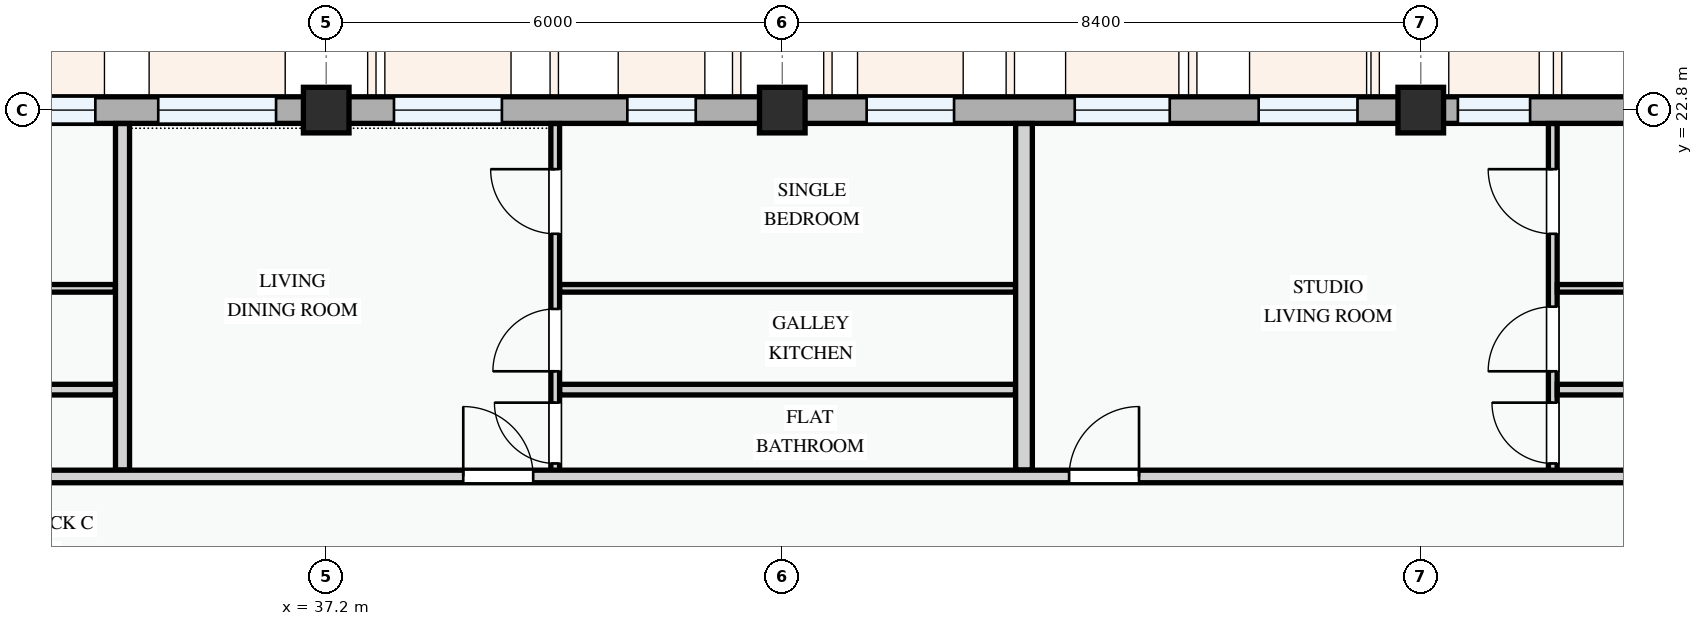
"""IFC4 building model, lengths in metres.
Left out: names, types, materials, properties, quantities, classifications, styles, units other than length and angle.
Written with IfcOpenShell. Run it as: python <this file> out.ifc"""

import sys

from ifc_helpers import new_model, si_unit, direction, frame, frame_2d, origin, origin_2d, place, context, subcontext, project, spatial, rectangle, extrude, element, fill, save


model = new_model("IFC4")
c1 = context("Model", 3, precision=1e-05, world=origin(), true_north=direction((0.0, 1.0)))
c2 = subcontext(c1, "Body", "Model", "MODEL_VIEW")
j1 = project(units=[si_unit("LENGTHUNIT", "METRE"), si_unit("PLANEANGLEUNIT", "RADIAN")], contexts=[c1])
p1 = place(None, origin())
s1 = spatial("IfcSite", under=j1, at=p1, CompositionType="ELEMENT")
p2 = place(p1, origin())
s2 = spatial("IfcBuilding", under=s1, at=p2, CompositionType="ELEMENT")
p3 = place(p2, frame((0.0, 0.0, 8.1)))
s3 = spatial("IfcBuildingStorey", under=s2, at=p3, CompositionType="ELEMENT", Elevation=8.1)
for number, where, z_axis, x_axis in (
    (1, (37.2, 22.8, 0.0), (0.0, 0.0, 1.0), (1.0, 0.0, 0.0)),
    (2, (43.2, 22.8, 0.0), (0.0, 0.0, 1.0), (1.0, 0.0, 0.0)),
    (3, (51.6, 22.8, 0.0), (0.0, 0.0, 1.0), (1.0, 0.0, 0.0)),
):
    element("IfcColumn", number, at=place(p3, frame(where, z_axis=z_axis, x_axis=x_axis)), inside=s3, PredefinedType="COLUMN", context=c2, shape_type="SweptSolid", body=[
        extrude(rectangle(XDim=0.6, YDim=0.6, at=origin_2d()), origin(), (0.0, 0.0, 1.0), 3.3),
    ])
p4 = place(p3, frame((57.6, 22.8, 0.0), z_axis=(0.0, 0.0, 1.0), x_axis=(-1.0, 0.0, 0.0)))
e4 = element("IfcWall", 4, at=p4, inside=s3, PredefinedType="STANDARD", context=c2, shape_type="SweptSolid", body=[
    extrude(rectangle(XDim=6.0, YDim=0.35, at=frame_2d((3.0, 0.0))), origin(), (0.0, 0.0, 1.0), 2.475),
])
p5 = place(p4, frame((1.777, 0.0, 0.78)))
e5 = element("IfcOpeningElement", 5, at=p5, cuts=e4, PredefinedType="OPENING", context=c2, shape_type="SweptSolid", body=[
    extrude(rectangle(XDim=0.9, YDim=1.2, at=frame_2d((0.45, 0.6))), frame((0.0, 0.185, 0.0), z_axis=(0.0, -1.0, 0.0), x_axis=(1.0, 0.0, 0.0)), (0.0, 0.0, 1.0), 0.37),
])
p6 = place(p4, frame((4.562, 0.0, 0.78)))
e6 = element("IfcOpeningElement", 6, at=p6, cuts=e4, PredefinedType="OPENING", context=c2, shape_type="SweptSolid", body=[
    extrude(rectangle(XDim=0.95, YDim=1.15, at=frame_2d((0.475, 0.575))), frame((0.0, 0.185, 0.0), z_axis=(0.0, -1.0, 0.0), x_axis=(1.0, 0.0, 0.0)), (0.0, 0.0, 1.0), 0.37),
])
p7 = place(p3, frame((51.6, 22.8, 0.0), z_axis=(0.0, 0.0, 1.0), x_axis=(-1.0, 0.0, 0.0)))
e7 = element("IfcWall", 7, at=p7, inside=s3, PredefinedType="STANDARD", context=c2, shape_type="SweptSolid", body=[
    extrude(rectangle(XDim=8.4, YDim=0.35, at=frame_2d((4.2, 0.0))), origin(), (0.0, 0.0, 1.0), 2.375),
])
p8 = place(p7, frame((0.833, 0.0, 0.78)))
e8 = element("IfcOpeningElement", 8, at=p8, cuts=e7, PredefinedType="OPENING", context=c2, shape_type="SweptSolid", body=[
    extrude(rectangle(XDim=1.3, YDim=1.4, at=frame_2d((0.65, 0.7))), frame((0.0, 0.185, 0.0), z_axis=(0.0, -1.0, 0.0), x_axis=(1.0, 0.0, 0.0)), (0.0, 0.0, 1.0), 0.37),
])
p9 = place(p7, frame((3.302, 0.0, 0.78)))
e9 = element("IfcOpeningElement", 9, at=p9, cuts=e7, PredefinedType="OPENING", context=c2, shape_type="SweptSolid", body=[
    extrude(rectangle(XDim=1.25, YDim=1.3, at=frame_2d((0.625, 0.65))), frame((0.0, 0.185, 0.0), z_axis=(0.0, -1.0, 0.0), x_axis=(1.0, 0.0, 0.0)), (0.0, 0.0, 1.0), 0.37),
])
p10 = place(p7, frame((6.14, 0.0, 0.78)))
e10 = element("IfcOpeningElement", 10, at=p10, cuts=e7, PredefinedType="OPENING", context=c2, shape_type="SweptSolid", body=[
    extrude(rectangle(XDim=1.15, YDim=1.25, at=frame_2d((0.575, 0.625))), frame((0.0, 0.185, 0.0), z_axis=(0.0, -1.0, 0.0), x_axis=(1.0, 0.0, 0.0)), (0.0, 0.0, 1.0), 0.37),
])
p11 = place(p3, frame((43.2, 22.8, 0.0), z_axis=(0.0, 0.0, 1.0), x_axis=(-1.0, 0.0, 0.0)))
e11 = element("IfcWall", 11, at=p11, inside=s3, PredefinedType="STANDARD", context=c2, shape_type="SweptSolid", body=[
    extrude(rectangle(XDim=6.0, YDim=0.35, at=frame_2d((3.0, 0.0))), origin(), (0.0, 0.0, 1.0), 2.475),
])
p12 = place(p11, frame((1.139, 0.0, 0.78)))
e12 = element("IfcOpeningElement", 12, at=p12, cuts=e11, PredefinedType="OPENING", context=c2, shape_type="SweptSolid", body=[
    extrude(rectangle(XDim=0.9, YDim=1.2, at=frame_2d((0.45, 0.6))), frame((0.0, 0.185, 0.0), z_axis=(0.0, -1.0, 0.0), x_axis=(1.0, 0.0, 0.0)), (0.0, 0.0, 1.0), 0.37),
])
p13 = place(p11, frame((3.689, 0.0, 0.78)))
e13 = element("IfcOpeningElement", 13, at=p13, cuts=e11, PredefinedType="OPENING", context=c2, shape_type="SweptSolid", body=[
    extrude(rectangle(XDim=1.42, YDim=1.38, at=frame_2d((0.71, 0.69))), frame((0.0, 0.185, 0.0), z_axis=(0.0, -1.0, 0.0), x_axis=(1.0, 0.0, 0.0)), (0.0, 0.0, 1.0), 0.37),
])
p14 = place(p3, frame((37.2, 22.8, 0.0), z_axis=(0.0, 0.0, 1.0), x_axis=(-1.0, 0.0, 0.0)))
e14 = element("IfcWall", 14, at=p14, inside=s3, PredefinedType="STANDARD", context=c2, shape_type="SweptSolid", body=[
    extrude(rectangle(XDim=8.4, YDim=0.35, at=frame_2d((4.2, 0.0))), origin(), (0.0, 0.0, 1.0), 2.375),
])
p15 = place(p14, frame((0.66, 0.0, 0.78)))
e15 = element("IfcOpeningElement", 15, at=p15, cuts=e14, PredefinedType="OPENING", context=c2, shape_type="SweptSolid", body=[
    extrude(rectangle(XDim=1.55, YDim=1.4, at=frame_2d((0.775, 0.7))), frame((0.0, 0.185, 0.0), z_axis=(0.0, -1.0, 0.0), x_axis=(1.0, 0.0, 0.0)), (0.0, 0.0, 1.0), 0.37),
])
p16 = place(p14, frame((3.038, 0.0, 0.78)))
e16 = element("IfcOpeningElement", 16, at=p16, cuts=e14, PredefinedType="OPENING", context=c2, shape_type="SweptSolid", body=[
    extrude(rectangle(XDim=2.12, YDim=1.44, at=frame_2d((1.06, 0.72))), frame((0.0, 0.185, 0.0), z_axis=(0.0, -1.0, 0.0), x_axis=(1.0, 0.0, 0.0)), (0.0, 0.0, 1.0), 0.37),
])
p17 = place(p14, frame((6.093, 0.0, 0.78)))
e17 = element("IfcOpeningElement", 17, at=p17, cuts=e14, PredefinedType="OPENING", context=c2, shape_type="SweptSolid", body=[
    extrude(rectangle(XDim=1.4, YDim=1.45, at=frame_2d((0.7, 0.725))), frame((0.0, 0.185, 0.0), z_axis=(0.0, -1.0, 0.0), x_axis=(1.0, 0.0, 0.0)), (0.0, 0.0, 1.0), 0.37),
])
p18 = place(p3, frame((27.112, 20.455, 0.0), z_axis=(0.0, 0.0, 1.0), x_axis=(1.0, 0.0, 0.0)))
e18 = element("IfcWall", 18, at=p18, inside=s3, PredefinedType="PARTITIONING", context=c2, shape_type="SweptSolid", body=[
    extrude(rectangle(XDim=7.313, YDim=0.1, at=frame_2d((3.657, 0.0))), origin(), (0.0, 0.0, 1.0), 3.0),
])
p19 = place(p3, frame((27.112, 19.122, 0.0), z_axis=(0.0, 0.0, 1.0), x_axis=(1.0, 0.0, 0.0)))
e19 = element("IfcWall", 19, at=p19, inside=s3, PredefinedType="PARTITIONING", context=c2, shape_type="SweptSolid", body=[
    extrude(rectangle(XDim=7.313, YDim=0.14, at=frame_2d((3.657, 0.0))), origin(), (0.0, 0.0, 1.0), 3.0),
])
p20 = place(p3, frame((40.213, 17.98, 0.0), z_axis=(0.0, 0.0, 1.0), x_axis=(0.0, 1.0, 0.0)))
e20 = element("IfcWall", 20, at=p20, inside=s3, PredefinedType="PARTITIONING", context=c2, shape_type="SweptSolid", body=[
    extrude(rectangle(XDim=4.643, YDim=0.115, at=frame_2d((2.322, 0.0))), origin(), (0.0, 0.0, 1.0), 3.0),
])
p21 = place(p20, frame((0.171, 0.0, 0.0)))
e21 = element("IfcOpeningElement", 21, at=p21, cuts=e20, PredefinedType="OPENING", context=c2, shape_type="SweptSolid", body=[
    extrude(rectangle(XDim=0.8, YDim=2.1, at=frame_2d((0.4, 1.05))), frame((0.0, 0.067, 0.0), z_axis=(0.0, -1.0, 0.0), x_axis=(1.0, 0.0, 0.0)), (0.0, 0.0, 1.0), 0.135),
])
p22 = place(p20, frame((1.384, 0.0, 0.0)))
e22 = element("IfcOpeningElement", 22, at=p22, cuts=e20, PredefinedType="OPENING", context=c2, shape_type="SweptSolid", body=[
    extrude(rectangle(XDim=0.82, YDim=2.08, at=frame_2d((0.41, 1.04))), frame((0.0, 0.067, 0.0), z_axis=(0.0, -1.0, 0.0), x_axis=(1.0, 0.0, 0.0)), (0.0, 0.0, 1.0), 0.135),
])
p23 = place(p20, frame((3.193, 0.0, 0.0)))
e23 = element("IfcOpeningElement", 23, at=p23, cuts=e20, PredefinedType="OPENING", context=c2, shape_type="SweptSolid", body=[
    extrude(rectangle(XDim=0.85, YDim=2.1, at=frame_2d((0.425, 1.05))), frame((0.0, 0.067, 0.0), z_axis=(0.0, -1.0, 0.0), x_axis=(1.0, 0.0, 0.0)), (0.0, 0.0, 1.0), 0.135),
])
p24 = place(p3, frame((40.272, 20.455, 0.0), z_axis=(0.0, 0.0, 1.0), x_axis=(1.0, 0.0, 0.0)))
e24 = element("IfcWall", 24, at=p24, inside=s3, PredefinedType="PARTITIONING", context=c2, shape_type="SweptSolid", body=[
    extrude(rectangle(XDim=5.996, YDim=0.1, at=frame_2d((2.998, 0.0))), origin(), (0.0, 0.0, 1.0), 3.0),
])
p25 = place(p3, frame((40.272, 19.122, 0.0), z_axis=(0.0, 0.0, 1.0), x_axis=(1.0, 0.0, 0.0)))
e25 = element("IfcWall", 25, at=p25, inside=s3, PredefinedType="PARTITIONING", context=c2, shape_type="SweptSolid", body=[
    extrude(rectangle(XDim=5.996, YDim=0.14, at=frame_2d((2.998, 0.0))), origin(), (0.0, 0.0, 1.0), 3.0),
])
p26 = place(p3, frame((34.52, 18.064, 0.0), z_axis=(0.0, 0.0, 1.0), x_axis=(0.0, 1.0, 0.0)))
e26 = element("IfcWall", 26, at=p26, inside=s3, PredefinedType="PARTITIONING", context=c2, shape_type="SweptSolid", body=[
    extrude(rectangle(XDim=4.559, YDim=0.185, at=frame_2d((2.279, 0.0))), origin(), (0.0, 0.0, 1.0), 3.0),
])
p27 = place(p3, frame((53.337, 17.98, 0.0), z_axis=(0.0, 0.0, 1.0), x_axis=(0.0, 1.0, 0.0)))
e27 = element("IfcWall", 27, at=p27, inside=s3, PredefinedType="PARTITIONING", context=c2, shape_type="SweptSolid", body=[
    extrude(rectangle(XDim=4.643, YDim=0.115, at=frame_2d((2.322, 0.0))), origin(), (0.0, 0.0, 1.0), 3.0),
])
p28 = place(p27, frame((0.171, 0.0, 0.0)))
e28 = element("IfcOpeningElement", 28, at=p28, cuts=e27, PredefinedType="OPENING", context=c2, shape_type="SweptSolid", body=[
    extrude(rectangle(XDim=0.8, YDim=2.1, at=frame_2d((0.4, 1.05))), frame((0.0, 0.067, 0.0), z_axis=(0.0, -1.0, 0.0), x_axis=(1.0, 0.0, 0.0)), (0.0, 0.0, 1.0), 0.135),
])
p29 = place(p27, frame((1.384, 0.0, 0.0)))
e29 = element("IfcOpeningElement", 29, at=p29, cuts=e27, PredefinedType="OPENING", context=c2, shape_type="SweptSolid", body=[
    extrude(rectangle(XDim=0.85, YDim=2.1, at=frame_2d((0.425, 1.05))), frame((0.0, 0.067, 0.0), z_axis=(0.0, -1.0, 0.0), x_axis=(1.0, 0.0, 0.0)), (0.0, 0.0, 1.0), 0.135),
])
p30 = place(p27, frame((3.193, 0.0, 0.0)))
e30 = element("IfcOpeningElement", 30, at=p30, cuts=e27, PredefinedType="OPENING", context=c2, shape_type="SweptSolid", body=[
    extrude(rectangle(XDim=0.85, YDim=2.1, at=frame_2d((0.425, 1.05))), frame((0.0, 0.067, 0.0), z_axis=(0.0, -1.0, 0.0), x_axis=(1.0, 0.0, 0.0)), (0.0, 0.0, 1.0), 0.135),
])
p31 = place(p3, frame((53.396, 20.455, 0.0), z_axis=(0.0, 0.0, 1.0), x_axis=(1.0, 0.0, 0.0)))
e31 = element("IfcWall", 31, at=p31, inside=s3, PredefinedType="PARTITIONING", context=c2, shape_type="SweptSolid", body=[
    extrude(rectangle(XDim=4.027, YDim=0.1, at=frame_2d((2.013, 0.0))), origin(), (0.0, 0.0, 1.0), 3.0),
])
p32 = place(p3, frame((53.396, 19.122, 0.0), z_axis=(0.0, 0.0, 1.0), x_axis=(1.0, 0.0, 0.0)))
e32 = element("IfcWall", 32, at=p32, inside=s3, PredefinedType="PARTITIONING", context=c2, shape_type="SweptSolid", body=[
    extrude(rectangle(XDim=4.027, YDim=0.14, at=frame_2d((2.013, 0.0))), origin(), (0.0, 0.0, 1.0), 3.0),
])
p33 = place(p3, frame((46.38, 18.064, 0.0), z_axis=(0.0, 0.0, 1.0), x_axis=(0.0, 1.0, 0.0)))
e33 = element("IfcWall", 33, at=p33, inside=s3, PredefinedType="PARTITIONING", context=c2, shape_type="SweptSolid", body=[
    extrude(rectangle(XDim=4.559, YDim=0.22, at=frame_2d((2.279, 0.0))), origin(), (0.0, 0.0, 1.0), 3.0),
])
p34 = place(p3, frame((22.66, 17.98, 0.0), z_axis=(0.0, 0.0, 1.0), x_axis=(1.0, 0.0, 0.0)))
e34 = element("IfcWall", 34, at=p34, inside=s3, PredefinedType="PARTITIONING", context=c2, shape_type="SweptSolid", body=[
    extrude(rectangle(XDim=34.763, YDim=0.165, at=frame_2d((17.382, 0.0))), origin(), (0.0, 0.0, 1.0), 3.0),
])
p35 = place(p34, frame((2.633, 0.0, 0.0)))
e35 = element("IfcOpeningElement", 35, at=p35, cuts=e34, PredefinedType="OPENING", context=c2, shape_type="SweptSolid", body=[
    extrude(rectangle(XDim=0.92, YDim=2.1, at=frame_2d((0.46, 1.05))), frame((0.0, 0.093, 0.0), z_axis=(0.0, -1.0, 0.0), x_axis=(1.0, 0.0, 0.0)), (0.0, 0.0, 1.0), 0.185),
])
p36 = place(p34, frame((16.343, 0.0, 0.0)))
e36 = element("IfcOpeningElement", 36, at=p36, cuts=e34, PredefinedType="OPENING", context=c2, shape_type="SweptSolid", body=[
    extrude(rectangle(XDim=0.92, YDim=2.1, at=frame_2d((0.46, 1.05))), frame((0.0, 0.093, 0.0), z_axis=(0.0, -1.0, 0.0), x_axis=(1.0, 0.0, 0.0)), (0.0, 0.0, 1.0), 0.185),
])
p37 = place(p34, frame((24.313, 0.0, 0.0)))
e37 = element("IfcOpeningElement", 37, at=p37, cuts=e34, PredefinedType="OPENING", context=c2, shape_type="SweptSolid", body=[
    extrude(rectangle(XDim=0.92, YDim=2.1, at=frame_2d((0.46, 1.05))), frame((0.0, 0.093, 0.0), z_axis=(0.0, -1.0, 0.0), x_axis=(1.0, 0.0, 0.0)), (0.0, 0.0, 1.0), 0.185),
])
p38 = place(p6, origin())
e38 = element("IfcWindow", 38, at=p38, inside=s3, PartitioningType="SINGLE_PANEL", PredefinedType="WINDOW", context=c2, shape_type="SweptSolid", body=[
    extrude(rectangle(XDim=0.95, YDim=1.15, at=frame_2d((0.475, 0.575))), frame((0.0, 0.03, 0.0), z_axis=(0.0, -1.0, 0.0), x_axis=(1.0, 0.0, 0.0)), (0.0, 0.0, 1.0), 0.06),
])
fill(e6, e38)
p39 = place(p8, origin())
e39 = element("IfcWindow", 39, at=p39, inside=s3, PartitioningType="SINGLE_PANEL", PredefinedType="WINDOW", context=c2, shape_type="SweptSolid", body=[
    extrude(rectangle(XDim=1.3, YDim=1.4, at=frame_2d((0.65, 0.7))), frame((0.0, 0.03, 0.0), z_axis=(0.0, -1.0, 0.0), x_axis=(1.0, 0.0, 0.0)), (0.0, 0.0, 1.0), 0.06),
])
fill(e8, e39)
p40 = place(p9, origin())
e40 = element("IfcWindow", 40, at=p40, inside=s3, PartitioningType="SINGLE_PANEL", PredefinedType="WINDOW", context=c2, shape_type="SweptSolid", body=[
    extrude(rectangle(XDim=1.25, YDim=1.3, at=frame_2d((0.625, 0.65))), frame((0.0, 0.03, 0.0), z_axis=(0.0, -1.0, 0.0), x_axis=(1.0, 0.0, 0.0)), (0.0, 0.0, 1.0), 0.06),
])
fill(e9, e40)
p41 = place(p10, origin())
e41 = element("IfcWindow", 41, at=p41, inside=s3, PartitioningType="SINGLE_PANEL", PredefinedType="WINDOW", context=c2, shape_type="SweptSolid", body=[
    extrude(rectangle(XDim=1.15, YDim=1.25, at=frame_2d((0.575, 0.625))), frame((0.0, 0.03, 0.0), z_axis=(0.0, -1.0, 0.0), x_axis=(1.0, 0.0, 0.0)), (0.0, 0.0, 1.0), 0.06),
])
fill(e10, e41)
p42 = place(p12, origin())
e42 = element("IfcWindow", 42, at=p42, inside=s3, PartitioningType="SINGLE_PANEL", PredefinedType="WINDOW", context=c2, shape_type="SweptSolid", body=[
    extrude(rectangle(XDim=0.9, YDim=1.2, at=frame_2d((0.45, 0.6))), frame((0.0, 0.03, 0.0), z_axis=(0.0, -1.0, 0.0), x_axis=(1.0, 0.0, 0.0)), (0.0, 0.0, 1.0), 0.06),
])
fill(e12, e42)
p43 = place(p13, origin())
e43 = element("IfcWindow", 43, at=p43, inside=s3, PartitioningType="SINGLE_PANEL", PredefinedType="WINDOW", context=c2, shape_type="SweptSolid", body=[
    extrude(rectangle(XDim=1.42, YDim=1.38, at=frame_2d((0.71, 0.69))), frame((0.0, 0.03, 0.0), z_axis=(0.0, -1.0, 0.0), x_axis=(1.0, 0.0, 0.0)), (0.0, 0.0, 1.0), 0.06),
])
fill(e13, e43)
p44 = place(p15, origin())
e44 = element("IfcWindow", 44, at=p44, inside=s3, PartitioningType="SINGLE_PANEL", PredefinedType="WINDOW", context=c2, shape_type="SweptSolid", body=[
    extrude(rectangle(XDim=1.55, YDim=1.4, at=frame_2d((0.775, 0.7))), frame((0.0, 0.03, 0.0), z_axis=(0.0, -1.0, 0.0), x_axis=(1.0, 0.0, 0.0)), (0.0, 0.0, 1.0), 0.06),
])
fill(e15, e44)
p45 = place(p16, origin())
e45 = element("IfcWindow", 45, at=p45, inside=s3, PartitioningType="DOUBLE_PANEL_VERTICAL", PredefinedType="WINDOW", context=c2, shape_type="SweptSolid", body=[
    extrude(rectangle(XDim=2.12, YDim=1.44, at=frame_2d((1.06, 0.72))), frame((0.0, 0.03, 0.0), z_axis=(0.0, -1.0, 0.0), x_axis=(1.0, 0.0, 0.0)), (0.0, 0.0, 1.0), 0.06),
])
fill(e16, e45)
p46 = place(p21, origin())
e46 = element("IfcDoor", 46, at=p46, inside=s3, OperationType="SINGLE_SWING_RIGHT", PredefinedType="DOOR", context=c2, shape_type="SweptSolid", body=[
    extrude(rectangle(XDim=0.8, YDim=2.1, at=frame_2d((0.4, 1.05))), frame((0.0, 0.025, 0.0), z_axis=(0.0, -1.0, 0.0), x_axis=(1.0, 0.0, 0.0)), (0.0, 0.0, 1.0), 0.05),
])
fill(e21, e46)
p47 = place(p22, origin())
e47 = element("IfcDoor", 47, at=p47, inside=s3, OperationType="SINGLE_SWING_LEFT", PredefinedType="DOOR", context=c2, shape_type="SweptSolid", body=[
    extrude(rectangle(XDim=0.82, YDim=2.08, at=frame_2d((0.41, 1.04))), frame((0.0, 0.025, 0.0), z_axis=(0.0, -1.0, 0.0), x_axis=(1.0, 0.0, 0.0)), (0.0, 0.0, 1.0), 0.05),
])
fill(e22, e47)
p48 = place(p23, origin())
e48 = element("IfcDoor", 48, at=p48, inside=s3, OperationType="SINGLE_SWING_RIGHT", PredefinedType="DOOR", context=c2, shape_type="SweptSolid", body=[
    extrude(rectangle(XDim=0.85, YDim=2.1, at=frame_2d((0.425, 1.05))), frame((0.0, 0.025, 0.0), z_axis=(0.0, -1.0, 0.0), x_axis=(1.0, 0.0, 0.0)), (0.0, 0.0, 1.0), 0.05),
])
fill(e23, e48)
p49 = place(p28, origin())
e49 = element("IfcDoor", 49, at=p49, inside=s3, OperationType="SINGLE_SWING_RIGHT", PredefinedType="DOOR", context=c2, shape_type="SweptSolid", body=[
    extrude(rectangle(XDim=0.8, YDim=2.1, at=frame_2d((0.4, 1.05))), frame((0.0, 0.025, 0.0), z_axis=(0.0, -1.0, 0.0), x_axis=(1.0, 0.0, 0.0)), (0.0, 0.0, 1.0), 0.05),
])
fill(e28, e49)
p50 = place(p29, origin())
e50 = element("IfcDoor", 50, at=p50, inside=s3, OperationType="SINGLE_SWING_LEFT", PredefinedType="DOOR", context=c2, shape_type="SweptSolid", body=[
    extrude(rectangle(XDim=0.85, YDim=2.1, at=frame_2d((0.425, 1.05))), frame((0.0, 0.025, 0.0), z_axis=(0.0, -1.0, 0.0), x_axis=(1.0, 0.0, 0.0)), (0.0, 0.0, 1.0), 0.05),
])
fill(e29, e50)
p51 = place(p30, origin())
e51 = element("IfcDoor", 51, at=p51, inside=s3, OperationType="SINGLE_SWING_RIGHT", PredefinedType="DOOR", context=c2, shape_type="SweptSolid", body=[
    extrude(rectangle(XDim=0.85, YDim=2.1, at=frame_2d((0.425, 1.05))), frame((0.0, 0.025, 0.0), z_axis=(0.0, -1.0, 0.0), x_axis=(1.0, 0.0, 0.0)), (0.0, 0.0, 1.0), 0.05),
])
fill(e30, e51)
p52 = place(p36, origin())
e52 = element("IfcDoor", 52, at=p52, inside=s3, OperationType="SINGLE_SWING_LEFT", PredefinedType="DOOR", context=c2, shape_type="SweptSolid", body=[
    extrude(rectangle(XDim=0.92, YDim=2.1, at=frame_2d((0.46, 1.05))), frame((0.0, 0.025, 0.0), z_axis=(0.0, -1.0, 0.0), x_axis=(1.0, 0.0, 0.0)), (0.0, 0.0, 1.0), 0.05),
])
fill(e36, e52)
p53 = place(p37, origin())
e53 = element("IfcDoor", 53, at=p53, inside=s3, OperationType="SINGLE_SWING_RIGHT", PredefinedType="DOOR", context=c2, shape_type="SweptSolid", body=[
    extrude(rectangle(XDim=0.92, YDim=2.1, at=frame_2d((0.46, 1.05))), frame((0.0, 0.025, 0.0), z_axis=(0.0, -1.0, 0.0), x_axis=(1.0, 0.0, 0.0)), (0.0, 0.0, 1.0), 0.05),
])
fill(e37, e53)
save(model, sys.argv[1])
